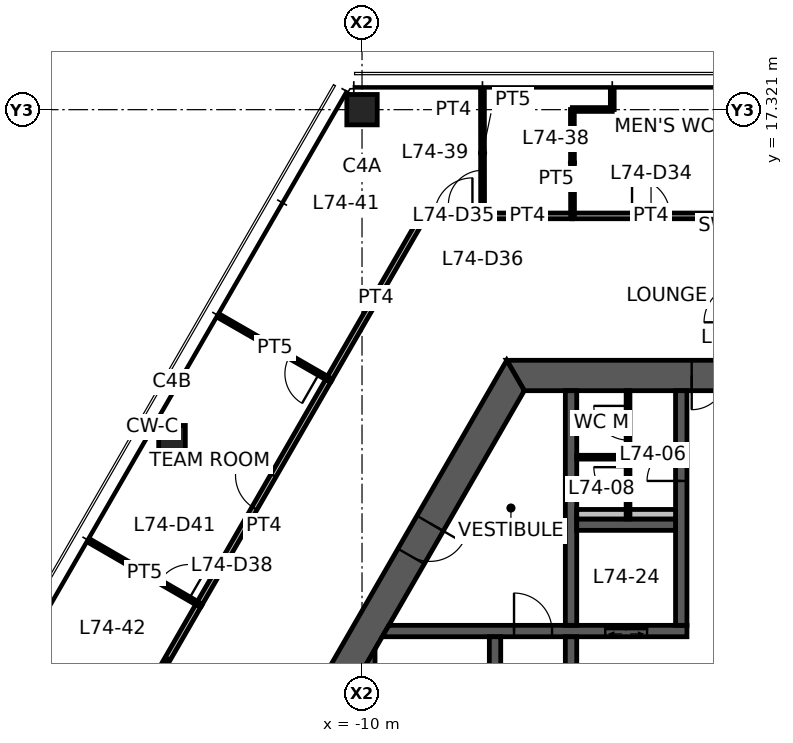
"""IFC4 building model, lengths in metres.
Left out: names, types, materials, properties, quantities, classifications, styles, units other than length and angle.
Written with IfcOpenShell. Run it as: python <this file> out.ifc"""

import sys

from ifc_helpers import new_model, si_unit, direction, frame, frame_2d, origin, origin_2d, place, context, subcontext, project, spatial, polyline, rectangle, hollow_rectangle, outline, extrude, element, fill, save


model = new_model("IFC4")
c1 = context("Model", 3, precision=1e-05, world=origin(), true_north=direction((0.0, 1.0)))
c2 = subcontext(c1, "Body", "Model", "MODEL_VIEW")
j1 = project(units=[si_unit("LENGTHUNIT", "METRE"), si_unit("PLANEANGLEUNIT", "RADIAN")], contexts=[c1])
p1 = place(None, origin())
s1 = spatial("IfcSite", under=j1, at=p1, CompositionType="ELEMENT")
p2 = place(p1, origin())
s2 = spatial("IfcBuilding", under=s1, at=p2, CompositionType="ELEMENT")
p3 = place(p2, frame((0.0, 0.0, 294.7)))
s3 = spatial("IfcBuildingStorey", under=s2, at=p3, CompositionType="ELEMENT", Elevation=294.7)
p4 = place(p3, frame((-10.0, 17.321, 0.0), z_axis=(0.0, 0.0, 1.0), x_axis=(1.0, 0.0, 0.0)))
e1 = element("IfcColumn", 1, at=p4, inside=s3, PredefinedType="COLUMN", context=c2, shape_type="SweptSolid", body=[
    extrude(hollow_rectangle(XDim=0.8, YDim=0.8, WallThickness=0.04, at=origin_2d()), origin(), (0.0, 0.0, 1.0), 3.9),
])
p5 = place(p3, frame((-15.0, 8.66, 0.0), z_axis=(0.0, 0.0, 1.0), x_axis=(1.0, 0.0, 0.0)))
e2 = element("IfcColumn", 2, at=p5, inside=s3, PredefinedType="COLUMN", context=c2, shape_type="SweptSolid", body=[
    extrude(hollow_rectangle(XDim=0.7, YDim=0.7, WallThickness=0.032, at=origin_2d()), origin(), (0.0, 0.0, 1.0), 3.9),
])
p6 = place(p3, frame((5.961, 10.325, 0.0), z_axis=(0.0, 0.0, 1.0), x_axis=(-1.0, 0.0, 0.0)))
e3 = element("IfcWall", 3, at=p6, inside=s3, PredefinedType="SHEAR", context=c2, shape_type="SweptSolid", body=[
    extrude(outline(polyline([(-0.231, -0.4), (4.636, -0.4), (5.536, -0.4), (6.386, -0.4), (7.286, -0.4), (12.153, -0.4), (11.691, 0.4), (7.286, 0.4), (6.386, 0.4), (5.536, 0.4), (4.636, 0.4), (0.231, 0.4), (-0.231, -0.4)])), origin(), (0.0, 0.0, 1.0), 3.9),
])
p7 = place(p6, frame((6.386, 0.0, 0.0)))
e4 = element("IfcOpeningElement", 4, at=p7, cuts=e3, PredefinedType="OPENING", context=c2, shape_type="SweptSolid", body=[
    extrude(rectangle(XDim=0.9, YDim=2.1, at=frame_2d((0.45, 1.05))), frame((0.0, 0.41, 0.0), z_axis=(0.0, -1.0, 0.0), x_axis=(1.0, 0.0, 0.0)), (0.0, 0.0, 1.0), 0.82),
])
p8 = place(p6, frame((4.636, 0.0, 0.0)))
e5 = element("IfcOpeningElement", 5, at=p8, cuts=e3, PredefinedType="OPENING", context=c2, shape_type="SweptSolid", body=[
    extrude(rectangle(XDim=0.9, YDim=2.1, at=frame_2d((0.45, 1.05))), frame((0.0, 0.41, 0.0), z_axis=(0.0, -1.0, 0.0), x_axis=(1.0, 0.0, 0.0)), (0.0, 0.0, 1.0), 0.82),
])
p9 = place(p3, frame((-5.961, 10.325, 0.0), z_axis=(0.0, 0.0, 1.0), x_axis=(-0.500004296715, -0.866022923061, 0.0)))
e6 = element("IfcWall", 6, at=p9, inside=s3, PredefinedType="SHEAR", context=c2, shape_type="SweptSolid", body=[
    extrude(outline(polyline([(-0.231, -0.4), (4.494, -0.4), (5.494, -0.4), (12.153, -0.4), (11.691, 0.4), (5.494, 0.4), (4.494, 0.4), (0.231, 0.4), (-0.231, -0.4)])), origin(), (0.0, 0.0, 1.0), 3.9),
])
p10 = place(p9, frame((4.494, 0.0, 0.0)))
e7 = element("IfcOpeningElement", 7, at=p10, cuts=e6, PredefinedType="OPENING", context=c2, shape_type="SweptSolid", body=[
    extrude(rectangle(XDim=1.0, YDim=2.1, at=frame_2d((0.5, 1.05))), frame((0.0, 0.41, 0.0), z_axis=(0.0, -1.0, 0.0), x_axis=(1.0, 0.0, 0.0)), (0.0, 0.0, 1.0), 0.82),
])
p11 = place(p3, frame((-9.382, 3.6, 0.0), z_axis=(0.0, 0.0, 1.0), x_axis=(1.0, 0.0, 0.0)))
e8 = element("IfcWall", 8, at=p11, inside=s3, PredefinedType="SHEAR", context=c2, shape_type="SweptSolid", body=[
    extrude(outline(polyline([(-0.087, -0.15), (3.382, -0.15), (4.382, -0.15), (5.782, -0.15), (6.882, -0.15), (7.932, -0.15), (7.932, 0.15), (6.882, 0.15), (5.782, 0.15), (4.382, 0.15), (3.382, 0.15), (0.087, 0.15), (-0.087, -0.15)])), origin(), (0.0, 0.0, 1.0), 3.9),
])
p12 = place(p11, frame((3.382, 0.0, 0.0)))
e9 = element("IfcOpeningElement", 9, at=p12, cuts=e8, PredefinedType="OPENING", context=c2, shape_type="SweptSolid", body=[
    extrude(rectangle(XDim=1.0, YDim=2.1, at=frame_2d((0.5, 1.05))), frame((0.0, 0.16, 0.0), z_axis=(0.0, -1.0, 0.0), x_axis=(1.0, 0.0, 0.0)), (0.0, 0.0, 1.0), 0.32),
])
p13 = place(p11, frame((5.782, 0.0, 0.0)))
e10 = element("IfcOpeningElement", 10, at=p13, cuts=e8, PredefinedType="OPENING", context=c2, shape_type="SweptSolid", body=[
    extrude(rectangle(XDim=1.1, YDim=2.1, at=frame_2d((0.55, 1.05))), frame((0.0, 0.16, 0.0), z_axis=(0.0, -1.0, 0.0), x_axis=(1.0, 0.0, 0.0)), (0.0, 0.0, 1.0), 0.32),
])
p14 = place(p3, frame((-1.6, 3.75, 0.0), z_axis=(0.0, 0.0, 1.0), x_axis=(0.0, 1.0, 0.0)))
e11 = element("IfcWall", 11, at=p14, inside=s3, PredefinedType="SHEAR", context=c2, shape_type="SweptSolid", body=[
    extrude(rectangle(XDim=6.175, YDim=0.3, at=frame_2d((3.087, 0.0))), origin(), (0.0, 0.0, 1.0), 3.9),
])
p15 = place(p14, frame((3.8, 0.0, 0.0)))
e12 = element("IfcOpeningElement", 12, at=p15, cuts=e11, PredefinedType="OPENING", context=c2, shape_type="SweptSolid", body=[
    extrude(rectangle(XDim=0.9, YDim=2.1, at=frame_2d((0.45, 1.05))), frame((0.0, 0.16, 0.0), z_axis=(0.0, -1.0, 0.0), x_axis=(1.0, 0.0, 0.0)), (0.0, 0.0, 1.0), 0.32),
])
p16 = place(p3, frame((-4.5, -3.45, 0.0), z_axis=(0.0, 0.0, 1.0), x_axis=(0.0, 1.0, 0.0)))
e13 = element("IfcWall", 13, at=p16, inside=s3, PredefinedType="SHEAR", context=c2, shape_type="SweptSolid", body=[
    extrude(rectangle(XDim=6.9, YDim=0.3, at=frame_2d((3.45, 0.0))), origin(), (0.0, 0.0, 1.0), 3.9),
])
p17 = place(p16, frame((2.95, 0.0, 0.0)))
e14 = element("IfcOpeningElement", 14, at=p17, cuts=e13, PredefinedType="OPENING", context=c2, shape_type="SweptSolid", body=[
    extrude(rectangle(XDim=1.0, YDim=2.1, at=frame_2d((0.5, 1.05))), frame((0.0, 0.16, 0.0), z_axis=(0.0, -1.0, 0.0), x_axis=(1.0, 0.0, 0.0)), (0.0, 0.0, 1.0), 0.32),
])
p18 = place(p3, frame((-6.5, -3.45, 0.0), z_axis=(0.0, 0.0, 1.0), x_axis=(0.0, 1.0, 0.0)))
e15 = element("IfcWall", 15, at=p18, inside=s3, PredefinedType="SHEAR", context=c2, shape_type="SweptSolid", body=[
    extrude(rectangle(XDim=6.9, YDim=0.3, at=frame_2d((3.45, 0.0))), origin(), (0.0, 0.0, 1.0), 3.9),
])
p19 = place(p18, frame((0.1, 0.0, 0.0)))
e16 = element("IfcOpeningElement", 16, at=p19, cuts=e15, PredefinedType="OPENING", context=c2, shape_type="SweptSolid", body=[
    extrude(rectangle(XDim=1.0, YDim=2.1, at=frame_2d((0.5, 1.05))), frame((0.0, 0.16, 0.0), z_axis=(0.0, -1.0, 0.0), x_axis=(1.0, 0.0, 0.0)), (0.0, 0.0, 1.0), 0.32),
])
p20 = place(p3, frame((-4.5, 3.75, 0.0), z_axis=(0.0, 0.0, 1.0), x_axis=(0.0, 1.0, 0.0)))
e17 = element("IfcWall", 17, at=p20, inside=s3, PredefinedType="SHEAR", context=c2, shape_type="SweptSolid", body=[
    extrude(rectangle(XDim=6.175, YDim=0.3, at=frame_2d((3.087, 0.0))), origin(), (0.0, 0.0, 1.0), 3.9),
])
p21 = place(p3, frame((-4.35, 6.4, 0.0), z_axis=(0.0, 0.0, 1.0), x_axis=(1.0, 0.0, 0.0)))
e18 = element("IfcWall", 18, at=p21, inside=s3, PredefinedType="SHEAR", context=c2, shape_type="SweptSolid", body=[
    extrude(rectangle(XDim=2.6, YDim=0.3, at=frame_2d((1.3, 0.0))), origin(), (0.0, 0.0, 1.0), 3.9),
])
p22 = place(p3, frame((-9.808, -2.862, 0.0), z_axis=(0.0, 0.0, 1.0), x_axis=(0.0, 1.0, 0.0)))
e19 = element("IfcWall", 19, at=p22, inside=s3, PredefinedType="SHEAR", context=c2, shape_type="SweptSolid", body=[
    extrude(outline(polyline([(-0.26, -0.15), (5.984, -0.15), (5.465, 0.15), (0.26, 0.15), (-0.26, -0.15)])), origin(), (0.0, 0.0, 1.0), 3.9),
])
p23 = place(p3, frame((-4.35, 6.675, 0.0), z_axis=(0.0, 0.0, 1.0), x_axis=(1.0, 0.0, 0.0)))
e20 = element("IfcWall", 20, at=p23, inside=s3, PredefinedType="PLUMBINGWALL", context=c2, shape_type="SweptSolid", body=[
    extrude(rectangle(XDim=2.6, YDim=0.25, at=frame_2d((1.3, 0.0))), origin(), (0.0, 0.0, 1.0), 3.9),
])
p24 = place(p3, frame((-3.0, 6.55, 0.0), z_axis=(0.0, 0.0, 1.0), x_axis=(0.0, 1.0, 0.0)))
e21 = element("IfcWall", 21, at=p24, inside=s3, PredefinedType="PARTITIONING", context=c2, shape_type="SweptSolid", body=[
    extrude(rectangle(XDim=3.375, YDim=0.1, at=frame_2d((1.688, 0.0))), origin(), (0.0, 0.0, 1.0), 2.95),
])
p25 = place(p24, frame((2.075, 0.0, 0.0)))
e22 = element("IfcOpeningElement", 22, at=p25, cuts=e21, PredefinedType="OPENING", context=c2, shape_type="SweptSolid", body=[
    extrude(rectangle(XDim=0.9, YDim=2.1, at=frame_2d((0.45, 1.05))), frame((0.0, 0.06, 0.0), z_axis=(0.0, -1.0, 0.0), x_axis=(1.0, 0.0, 0.0)), (0.0, 0.0, 1.0), 0.12),
])
p26 = place(p24, frame((0.462, 0.0, 0.0)))
e23 = element("IfcOpeningElement", 23, at=p26, cuts=e21, PredefinedType="OPENING", context=c2, shape_type="SweptSolid", body=[
    extrude(rectangle(XDim=0.9, YDim=2.1, at=frame_2d((0.45, 1.05))), frame((0.0, 0.06, 0.0), z_axis=(0.0, -1.0, 0.0), x_axis=(1.0, 0.0, 0.0)), (0.0, 0.0, 1.0), 0.12),
])
p27 = place(p3, frame((-3.05, 8.175, 0.0), z_axis=(0.0, 0.0, 1.0), x_axis=(-1.0, 0.0, 0.0)))
e24 = element("IfcWall", 24, at=p27, inside=s3, PredefinedType="PARTITIONING", context=c2, shape_type="SweptSolid", body=[
    extrude(rectangle(XDim=1.3, YDim=0.1, at=frame_2d((0.65, 0.0))), origin(), (0.0, 0.0, 1.0), 2.95),
])
p28 = place(p3, frame((-4.47, 14.525, 0.0), z_axis=(0.0, 0.0, 1.0), x_axis=(1.0, 0.0, 0.0)))
e25 = element("IfcWall", 25, at=p28, inside=s3, PredefinedType="PARTITIONING", context=c2, shape_type="SweptSolid", body=[
    extrude(rectangle(XDim=4.15, YDim=0.15, at=frame_2d((2.075, 0.0))), origin(), (0.0, 0.0, 1.0), 2.95),
])
p29 = place(p28, frame((1.575, 0.0, 0.0)))
e26 = element("IfcOpeningElement", 26, at=p29, cuts=e25, PredefinedType="OPENING", context=c2, shape_type="SweptSolid", body=[
    extrude(rectangle(XDim=1.0, YDim=2.1, at=frame_2d((0.5, 1.05))), frame((0.0, 0.085, 0.0), z_axis=(0.0, -1.0, 0.0), x_axis=(1.0, 0.0, 0.0)), (0.0, 0.0, 1.0), 0.17),
])
p30 = place(p3, frame((-6.836, 14.525, 0.0), z_axis=(0.0, 0.0, 1.0), x_axis=(1.0, 0.0, 0.0)))
e27 = element("IfcWall", 27, at=p30, inside=s3, PredefinedType="PARTITIONING", context=c2, shape_type="SweptSolid", body=[
    extrude(rectangle(XDim=2.376, YDim=0.15, at=frame_2d((1.188, 0.0))), origin(), (0.0, 0.0, 1.0), 2.95),
])
p31 = place(p3, frame((-8.363, 14.525, 0.0), z_axis=(0.0, 0.0, 1.0), x_axis=(1.0, 0.0, 0.0)))
e28 = element("IfcWall", 28, at=p31, inside=s3, PredefinedType="PARTITIONING", context=c2, shape_type="SweptSolid", body=[
    extrude(rectangle(XDim=1.536, YDim=0.15, at=frame_2d((0.768, 0.0))), origin(), (0.0, 0.0, 1.0), 2.95),
])
p32 = place(p31, frame((0.268, 0.0, 0.0)))
e29 = element("IfcOpeningElement", 29, at=p32, cuts=e28, PredefinedType="OPENING", context=c2, shape_type="SweptSolid", body=[
    extrude(rectangle(XDim=1.0, YDim=2.1, at=frame_2d((0.5, 1.05))), frame((0.0, 0.085, 0.0), z_axis=(0.0, -1.0, 0.0), x_axis=(1.0, 0.0, 0.0)), (0.0, 0.0, 1.0), 0.17),
])
p33 = place(p3, frame((-4.465, 17.325, 0.0), z_axis=(0.0, 0.0, 1.0), x_axis=(1.0, 0.0, 0.0)))
e30 = element("IfcWall", 30, at=p33, inside=s3, PredefinedType="PARTITIONING", context=c2, shape_type="SweptSolid", body=[
    extrude(rectangle(XDim=1.05, YDim=0.1, at=frame_2d((0.525, 0.0))), origin(), (0.0, 0.0, 1.0), 2.95),
])
p34 = place(p3, frame((-4.46, 14.525, 0.0), z_axis=(0.0, 0.0, 1.0), x_axis=(-0.001831019688, 0.999998323682, 0.0)))
e31 = element("IfcWall", 31, at=p34, inside=s3, PredefinedType="PARTITIONING", context=c2, shape_type="SweptSolid", body=[
    extrude(rectangle(XDim=2.8, YDim=0.1, at=frame_2d((1.4, 0.0))), origin(), (0.0, 0.0, 1.0), 2.95),
])
p35 = place(p3, frame((-3.415, 17.325, 0.0), z_axis=(0.0, 0.0, 1.0), x_axis=(0.0, 1.0, 0.0)))
e32 = element("IfcWall", 32, at=p35, inside=s3, PredefinedType="PARTITIONING", context=c2, shape_type="SweptSolid", body=[
    extrude(rectangle(XDim=0.476, YDim=0.1, at=frame_2d((0.238, 0.0))), origin(), (0.0, 0.0, 1.0), 2.95),
])
p36 = place(p3, frame((-6.826, 14.525, 0.0), z_axis=(0.0, 0.0, 1.0), x_axis=(-0.001401178566, 0.999999018349, 0.0)))
e33 = element("IfcWall", 33, at=p36, inside=s3, PredefinedType="PARTITIONING", context=c2, shape_type="SweptSolid", body=[
    extrude(rectangle(XDim=3.311, YDim=0.1, at=frame_2d((1.655, 0.0))), origin(), (0.0, 0.0, 1.0), 2.95),
])
p37 = place(p36, frame((0.3, 0.0, 0.0)))
e34 = element("IfcOpeningElement", 34, at=p37, cuts=e33, PredefinedType="OPENING", context=c2, shape_type="SweptSolid", body=[
    extrude(rectangle(XDim=0.9, YDim=2.1, at=frame_2d((0.45, 1.05))), frame((0.0, 0.06, 0.0), z_axis=(0.0, -1.0, 0.0), x_axis=(1.0, 0.0, 0.0)), (0.0, 0.0, 1.0), 0.12),
])
p38 = place(p3, frame((-10.874, 10.216, 0.0), z_axis=(0.0, 0.0, 1.0), x_axis=(0.499988457423, 0.866032067792, 0.0)))
e35 = element("IfcWall", 35, at=p38, inside=s3, PredefinedType="PARTITIONING", context=c2, shape_type="SweptSolid", body=[
    extrude(rectangle(XDim=4.952, YDim=0.15, at=frame_2d((2.476, 0.0))), origin(), (0.0, 0.0, 1.0), 2.95),
])
p39 = place(p3, frame((-15.997, 1.342, 0.0), z_axis=(0.0, 0.0, 1.0), x_axis=(0.500032973541, 0.866006365664, 0.0)))
e36 = element("IfcWall", 36, at=p39, inside=s3, PredefinedType="PARTITIONING", context=c2, shape_type="SweptSolid", body=[
    extrude(rectangle(XDim=3.426, YDim=0.15, at=frame_2d((1.713, 0.0))), origin(), (0.0, 0.0, 1.0), 2.95),
])
p40 = place(p3, frame((-14.289, 4.301, 0.0), z_axis=(0.0, 0.0, 1.0), x_axis=(0.500020088259, 0.866013805512, 0.0)))
e37 = element("IfcWall", 37, at=p40, inside=s3, PredefinedType="PARTITIONING", context=c2, shape_type="SweptSolid", body=[
    extrude(rectangle(XDim=6.84, YDim=0.15, at=frame_2d((3.42, 0.0))), origin(), (0.0, 0.0, 1.0), 2.95),
])
p41 = place(p40, frame((2.92, 0.0, 0.0)))
e38 = element("IfcOpeningElement", 38, at=p41, cuts=e37, PredefinedType="OPENING", context=c2, shape_type="SweptSolid", body=[
    extrude(rectangle(XDim=1.0, YDim=2.1, at=frame_2d((0.5, 1.05))), frame((0.0, 0.085, 0.0), z_axis=(0.0, -1.0, 0.0), x_axis=(1.0, 0.0, 0.0)), (0.0, 0.0, 1.0), 0.17),
])
p42 = place(p3, frame((-10.869, 10.224, 0.0), z_axis=(0.0, 0.0, 1.0), x_axis=(-0.866757761015, 0.498729369218, 0.0)))
e39 = element("IfcWall", 39, at=p42, inside=s3, PredefinedType="PARTITIONING", context=c2, shape_type="SweptSolid", body=[
    extrude(rectangle(XDim=3.286, YDim=0.1, at=frame_2d((1.643, 0.0))), origin(), (0.0, 0.0, 1.0), 2.95),
])
p43 = place(p42, frame((0.3, 0.0, 0.0)))
e40 = element("IfcOpeningElement", 40, at=p43, cuts=e39, PredefinedType="OPENING", context=c2, shape_type="SweptSolid", body=[
    extrude(rectangle(XDim=0.9, YDim=2.1, at=frame_2d((0.45, 1.05))), frame((0.0, 0.06, 0.0), z_axis=(0.0, -1.0, 0.0), x_axis=(1.0, 0.0, 0.0)), (0.0, 0.0, 1.0), 0.12),
])
p44 = place(p3, frame((-17.154, 5.96, 0.0), z_axis=(0.0, 0.0, 1.0), x_axis=(0.865342122637, -0.501181614577, 0.0)))
e41 = element("IfcWall", 41, at=p44, inside=s3, PredefinedType="PARTITIONING", context=c2, shape_type="SweptSolid", body=[
    extrude(rectangle(XDim=3.311, YDim=0.1, at=frame_2d((1.655, 0.0))), origin(), (0.0, 0.0, 1.0), 2.95),
])
p45 = place(p44, frame((2.111, 0.0, 0.0)))
e42 = element("IfcOpeningElement", 42, at=p45, cuts=e41, PredefinedType="OPENING", context=c2, shape_type="SweptSolid", body=[
    extrude(rectangle(XDim=0.9, YDim=2.1, at=frame_2d((0.45, 1.05))), frame((0.0, 0.06, 0.0), z_axis=(0.0, -1.0, 0.0), x_axis=(1.0, 0.0, 0.0)), (0.0, 0.0, 1.0), 0.12),
])
p46 = place(p3, frame((-15.992, 1.351, 0.0), z_axis=(0.0, 0.0, 1.0), x_axis=(-0.866707153418, 0.498817311462, 0.0)))
e43 = element("IfcWall", 43, at=p46, inside=s3, PredefinedType="PARTITIONING", context=c2, shape_type="SweptSolid", body=[
    extrude(rectangle(XDim=3.286, YDim=0.1, at=frame_2d((1.643, 0.0))), origin(), (0.0, 0.0, 1.0), 2.95),
])
p47 = place(p7, origin())
e44 = element("IfcDoor", 44, at=p47, inside=s3, OperationType="SINGLE_SWING_RIGHT", PredefinedType="DOOR", context=c2, shape_type="SweptSolid", body=[
    extrude(rectangle(XDim=0.9, YDim=2.1, at=frame_2d((0.45, 1.05))), frame((0.0, 0.025, 0.0), z_axis=(0.0, -1.0, 0.0), x_axis=(1.0, 0.0, 0.0)), (0.0, 0.0, 1.0), 0.05),
])
fill(e4, e44)
p48 = place(p10, origin())
e45 = element("IfcDoor", 45, at=p48, inside=s3, OperationType="SINGLE_SWING_LEFT", PredefinedType="DOOR", context=c2, shape_type="SweptSolid", body=[
    extrude(rectangle(XDim=1.0, YDim=2.1, at=frame_2d((0.5, 1.05))), frame((0.0, 0.025, 0.0), z_axis=(0.0, -1.0, 0.0), x_axis=(1.0, 0.0, 0.0)), (0.0, 0.0, 1.0), 0.05),
])
fill(e7, e45)
p49 = place(p12, origin())
e46 = element("IfcDoor", 46, at=p49, inside=s3, OperationType="SINGLE_SWING_LEFT", PredefinedType="DOOR", context=c2, shape_type="SweptSolid", body=[
    extrude(rectangle(XDim=1.0, YDim=2.1, at=frame_2d((0.5, 1.05))), frame((0.0, 0.025, 0.0), z_axis=(0.0, -1.0, 0.0), x_axis=(1.0, 0.0, 0.0)), (0.0, 0.0, 1.0), 0.05),
])
fill(e9, e46)
p50 = place(p15, origin())
e47 = element("IfcDoor", 47, at=p50, inside=s3, OperationType="SINGLE_SWING_LEFT", PredefinedType="DOOR", context=c2, shape_type="SweptSolid", body=[
    extrude(rectangle(XDim=0.9, YDim=2.1, at=frame_2d((0.45, 1.05))), frame((0.0, 0.025, 0.0), z_axis=(0.0, -1.0, 0.0), x_axis=(1.0, 0.0, 0.0)), (0.0, 0.0, 1.0), 0.05),
])
fill(e12, e47)
p51 = place(p25, origin())
e48 = element("IfcDoor", 48, at=p51, inside=s3, OperationType="SINGLE_SWING_RIGHT", PredefinedType="DOOR", context=c2, shape_type="SweptSolid", body=[
    extrude(rectangle(XDim=0.9, YDim=2.1, at=frame_2d((0.45, 1.05))), frame((0.0, 0.025, 0.0), z_axis=(0.0, -1.0, 0.0), x_axis=(1.0, 0.0, 0.0)), (0.0, 0.0, 1.0), 0.05),
])
fill(e22, e48)
p52 = place(p26, origin())
e49 = element("IfcDoor", 49, at=p52, inside=s3, OperationType="SINGLE_SWING_RIGHT", PredefinedType="DOOR", context=c2, shape_type="SweptSolid", body=[
    extrude(rectangle(XDim=0.9, YDim=2.1, at=frame_2d((0.45, 1.05))), frame((0.0, 0.025, 0.0), z_axis=(0.0, -1.0, 0.0), x_axis=(1.0, 0.0, 0.0)), (0.0, 0.0, 1.0), 0.05),
])
fill(e23, e49)
p53 = place(p29, origin())
e50 = element("IfcDoor", 50, at=p53, inside=s3, OperationType="SINGLE_SWING_LEFT", PredefinedType="DOOR", context=c2, shape_type="SweptSolid", body=[
    extrude(rectangle(XDim=1.0, YDim=2.1, at=frame_2d((0.5, 1.05))), frame((0.0, 0.025, 0.0), z_axis=(0.0, -1.0, 0.0), x_axis=(1.0, 0.0, 0.0)), (0.0, 0.0, 1.0), 0.05),
])
fill(e26, e50)
p54 = place(p32, origin())
e51 = element("IfcDoor", 51, at=p54, inside=s3, OperationType="SINGLE_SWING_RIGHT", PredefinedType="DOOR", context=c2, shape_type="SweptSolid", body=[
    extrude(rectangle(XDim=1.0, YDim=2.1, at=frame_2d((0.5, 1.05))), frame((0.0, 0.025, 0.0), z_axis=(0.0, -1.0, 0.0), x_axis=(1.0, 0.0, 0.0)), (0.0, 0.0, 1.0), 0.05),
])
fill(e29, e51)
p55 = place(p37, origin())
e52 = element("IfcDoor", 52, at=p55, inside=s3, OperationType="SINGLE_SWING_LEFT", PredefinedType="DOOR", context=c2, shape_type="SweptSolid", body=[
    extrude(rectangle(XDim=0.9, YDim=2.1, at=frame_2d((0.45, 1.05))), frame((0.0, 0.025, 0.0), z_axis=(0.0, -1.0, 0.0), x_axis=(1.0, 0.0, 0.0)), (0.0, 0.0, 1.0), 0.05),
])
fill(e34, e52)
p56 = place(p41, origin())
e53 = element("IfcDoor", 53, at=p56, inside=s3, OperationType="SINGLE_SWING_RIGHT", PredefinedType="DOOR", context=c2, shape_type="SweptSolid", body=[
    extrude(rectangle(XDim=1.0, YDim=2.1, at=frame_2d((0.5, 1.05))), frame((0.0, 0.025, 0.0), z_axis=(0.0, -1.0, 0.0), x_axis=(1.0, 0.0, 0.0)), (0.0, 0.0, 1.0), 0.05),
])
fill(e38, e53)
p57 = place(p43, origin())
e54 = element("IfcDoor", 54, at=p57, inside=s3, OperationType="SINGLE_SWING_LEFT", PredefinedType="DOOR", context=c2, shape_type="SweptSolid", body=[
    extrude(rectangle(XDim=0.9, YDim=2.1, at=frame_2d((0.45, 1.05))), frame((0.0, 0.025, 0.0), z_axis=(0.0, -1.0, 0.0), x_axis=(1.0, 0.0, 0.0)), (0.0, 0.0, 1.0), 0.05),
])
fill(e40, e54)
p58 = place(p45, origin())
e55 = element("IfcDoor", 55, at=p58, inside=s3, OperationType="SINGLE_SWING_RIGHT", PredefinedType="DOOR", context=c2, shape_type="SweptSolid", body=[
    extrude(rectangle(XDim=0.9, YDim=2.1, at=frame_2d((0.45, 1.05))), frame((0.0, 0.025, 0.0), z_axis=(0.0, -1.0, 0.0), x_axis=(1.0, 0.0, 0.0)), (0.0, 0.0, 1.0), 0.05),
])
fill(e42, e55)
p59 = place(p13, origin())
e56 = element("IfcDoor", 56, at=p59, inside=s3, OperationType="DOUBLE_DOOR_SLIDING", PredefinedType="DOOR", context=c2, shape_type="SweptSolid", body=[
    extrude(rectangle(XDim=1.1, YDim=2.1, at=frame_2d((0.55, 1.05))), frame((0.0, 0.025, 0.0), z_axis=(0.0, -1.0, 0.0), x_axis=(1.0, 0.0, 0.0)), (0.0, 0.0, 1.0), 0.05),
])
fill(e10, e56)
save(model, sys.argv[1])
